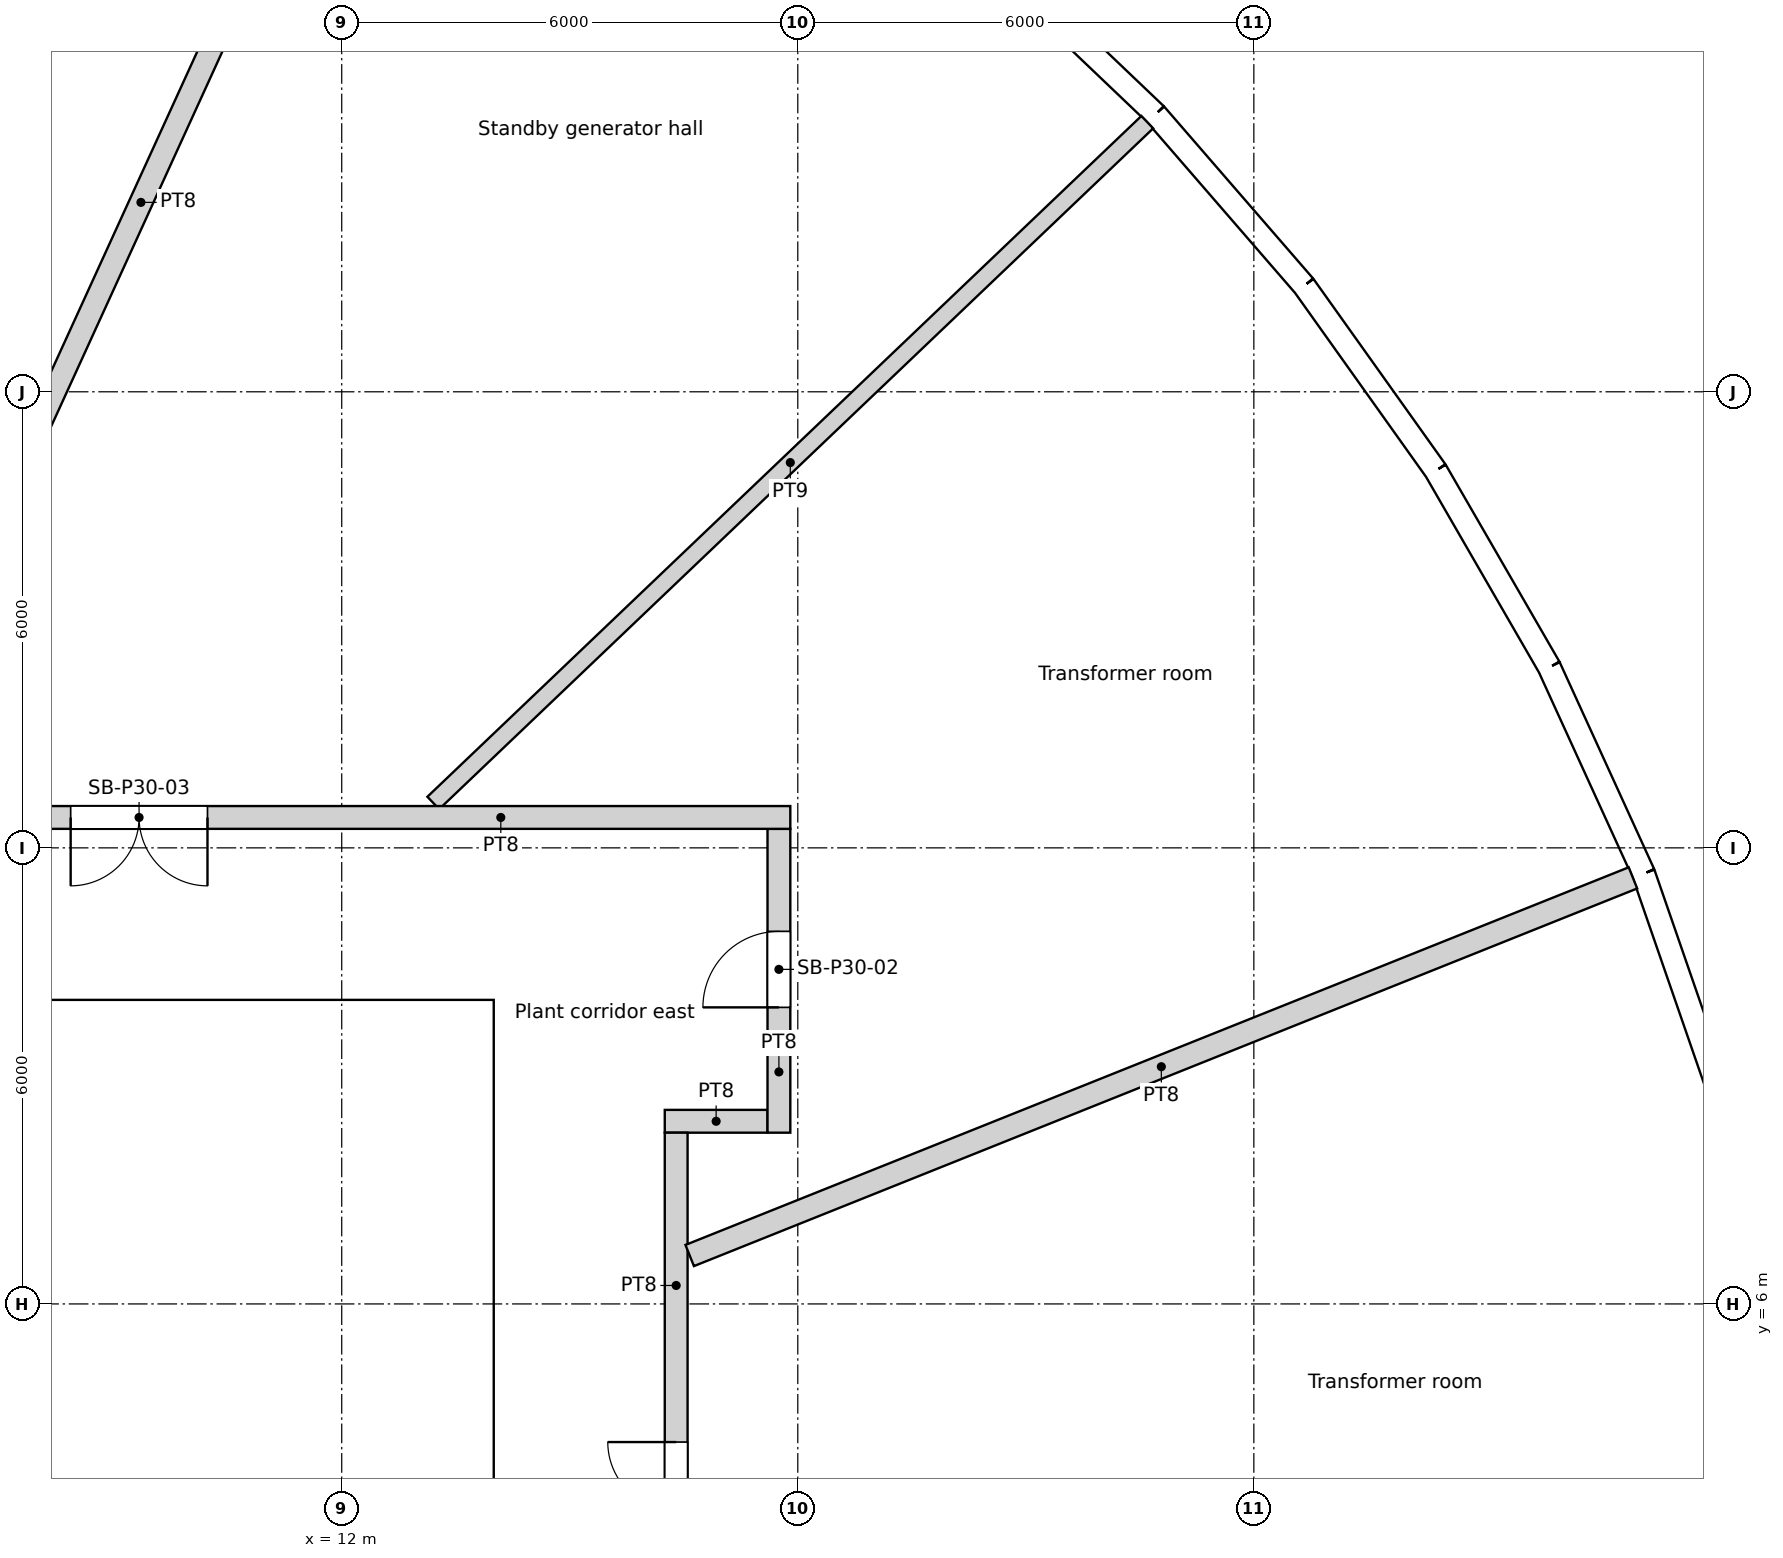
"""IFC4 building model, lengths in metres.
Left out: names, types, materials, properties, quantities, classifications, styles, units other than length and angle.
Written with IfcOpenShell. Run it as: python <this file> out.ifc"""

import sys

from ifc_helpers import new_model, si_unit, direction, frame, frame_2d, origin, origin_2d, place, context, subcontext, project, spatial, rectangle, circle, extrude, element, fill, save


model = new_model("IFC4")
c1 = context("Model", 3, precision=1e-05, world=origin(), true_north=direction((0.0, 1.0)))
c2 = subcontext(c1, "Body", "Model", "MODEL_VIEW")
j1 = project(units=[si_unit("LENGTHUNIT", "METRE"), si_unit("PLANEANGLEUNIT", "RADIAN")], contexts=[c1])
p1 = place(None, origin())
s1 = spatial("IfcSite", under=j1, at=p1, CompositionType="ELEMENT")
p2 = place(p1, origin())
s2 = spatial("IfcBuilding", under=s1, at=p2, CompositionType="ELEMENT")
p3 = place(p2, frame((0.0, 0.0, 120.0)))
s3 = spatial("IfcBuildingStorey", under=s2, at=p3, CompositionType="ELEMENT", Elevation=120.0)
for number, where, z_axis, x_axis in (
    (1, (29.728, 5.729, 0.0), (0.0, 0.0, 1.0), (1.0, 0.0, 0.0)),
    (2, (28.106, 11.252, 0.0), (0.0, 0.0, 1.0), (1.0, 0.0, 0.0)),
    (3, (25.469, 16.368, 0.0), (0.0, 0.0, 1.0), (1.0, 0.0, 0.0)),
    (4, (21.911, 20.892, 0.0), (0.0, 0.0, 1.0), (1.0, 0.0, 0.0)),
):
    element("IfcColumn", number, at=place(p3, frame(where, z_axis=z_axis, x_axis=x_axis)), inside=s3, PredefinedType="COLUMN", context=c2, shape_type="SweptSolid", body=[
        extrude(circle(Radius=0.6, at=origin_2d()), origin(), (0.0, 0.0, 1.0), 6.0),
    ])
for number, where, z_axis, x_axis in (
    (5, (23.886, 5.661, 0.0), (0.0, 0.0, 1.0), (1.0, 0.0, 0.0)),
    (6, (21.937, 11.017, 0.0), (0.0, 0.0, 1.0), (1.0, 0.0, 0.0)),
    (7, (18.805, 15.779, 0.0), (0.0, 0.0, 1.0), (1.0, 0.0, 0.0)),
    (8, (14.659, 19.69, 0.0), (0.0, 0.0, 1.0), (1.0, 0.0, 0.0)),
    (9, (9.723, 22.54, 0.0), (0.0, 0.0, 1.0), (1.0, 0.0, 0.0)),
):
    element("IfcColumn", number, at=place(p3, frame(where, z_axis=z_axis, x_axis=x_axis)), inside=s3, PredefinedType="COLUMN", context=c2, shape_type="SweptSolid", body=[
        extrude(circle(Radius=0.65, at=origin_2d()), origin(), (0.0, 0.0, 1.0), 6.0),
    ])
for number, where, z_axis, x_axis in (
    (10, (17.986, 5.548, 0.0), (0.0, 0.0, 1.0), (1.0, 0.0, 0.0)),
    (11, (15.552, 10.603, 0.0), (0.0, 0.0, 1.0), (1.0, 0.0, 0.0)),
    (12, (11.735, 14.716, 0.0), (0.0, 0.0, 1.0), (1.0, 0.0, 0.0)),
):
    element("IfcColumn", number, at=place(p3, frame(where, z_axis=z_axis, x_axis=x_axis)), inside=s3, PredefinedType="COLUMN", context=c2, shape_type="SweptSolid", body=[
        extrude(circle(Radius=0.7, at=origin_2d()), origin(), (0.0, 0.0, 1.0), 6.0),
    ])
p4 = place(p3, frame((30.104, 8.839, 0.0), z_axis=(0.0, 0.0, 1.0), x_axis=(-0.327074054052, 0.944998710669, 0.0)))
e13 = element("IfcWall", 13, at=p4, inside=s3, PredefinedType="SOLIDWALL", context=c2, shape_type="SweptSolid", body=[
    extrude(rectangle(XDim=2.986, YDim=0.3, at=frame_2d((1.493, 0.0))), origin(), (0.0, 0.0, 1.0), 5.7),
])
p5 = place(p4, frame((1.493, 0.0, 1.8)))
e14 = element("IfcOpeningElement", 14, at=p5, cuts=e13, PredefinedType="OPENING", context=c2, shape_type="SweptSolid", body=[
    extrude(circle(Radius=1.2, at=origin_2d()), frame((0.0, 0.16, 0.0), z_axis=(0.0, -1.0, 0.0), x_axis=(1.0, 0.0, 0.0)), (0.0, 0.0, 1.0), 0.32),
])
p6 = place(p3, frame((29.127, 11.661, 0.0), z_axis=(0.0, 0.0, 1.0), x_axis=(-0.415373250944, 0.909651066289, 0.0)))
e15 = element("IfcWall", 15, at=p6, inside=s3, PredefinedType="SOLIDWALL", context=c2, shape_type="SweptSolid", body=[
    extrude(rectangle(XDim=2.986, YDim=0.3, at=frame_2d((1.493, 0.0))), origin(), (0.0, 0.0, 1.0), 5.7),
])
p7 = place(p6, frame((1.493, 0.0, 1.8)))
e16 = element("IfcOpeningElement", 16, at=p7, cuts=e15, PredefinedType="OPENING", context=c2, shape_type="SweptSolid", body=[
    extrude(circle(Radius=1.2, at=origin_2d()), frame((0.0, 0.16, 0.0), z_axis=(0.0, -1.0, 0.0), x_axis=(1.0, 0.0, 0.0)), (0.0, 0.0, 1.0), 0.32),
])
p8 = place(p3, frame((27.887, 14.377, 0.0), z_axis=(0.0, 0.0, 1.0), x_axis=(-0.500017373705, 0.866015372839, 0.0)))
e17 = element("IfcWall", 17, at=p8, inside=s3, PredefinedType="SOLIDWALL", context=c2, shape_type="SweptSolid", body=[
    extrude(rectangle(XDim=2.986, YDim=0.3, at=frame_2d((1.493, 0.0))), origin(), (0.0, 0.0, 1.0), 5.7),
])
p9 = place(p8, frame((1.493, 0.0, 1.8)))
e18 = element("IfcOpeningElement", 18, at=p9, cuts=e17, PredefinedType="OPENING", context=c2, shape_type="SweptSolid", body=[
    extrude(circle(Radius=1.2, at=origin_2d()), frame((0.0, 0.16, 0.0), z_axis=(0.0, -1.0, 0.0), x_axis=(1.0, 0.0, 0.0)), (0.0, 0.0, 1.0), 0.32),
])
p10 = place(p3, frame((26.394, 16.962, 0.0), z_axis=(0.0, 0.0, 1.0), x_axis=(-0.580100533892, 0.814544885551, 0.0)))
e19 = element("IfcWall", 19, at=p10, inside=s3, PredefinedType="SOLIDWALL", context=c2, shape_type="SweptSolid", body=[
    extrude(rectangle(XDim=2.986, YDim=0.3, at=frame_2d((1.493, 0.0))), origin(), (0.0, 0.0, 1.0), 5.7),
])
p11 = place(p10, frame((1.493, 0.0, 1.8)))
e20 = element("IfcOpeningElement", 20, at=p11, cuts=e19, PredefinedType="OPENING", context=c2, shape_type="SweptSolid", body=[
    extrude(circle(Radius=1.2, at=origin_2d()), frame((0.0, 0.16, 0.0), z_axis=(0.0, -1.0, 0.0), x_axis=(1.0, 0.0, 0.0)), (0.0, 0.0, 1.0), 0.32),
])
p12 = place(p3, frame((24.662, 19.394, 0.0), z_axis=(0.0, 0.0, 1.0), x_axis=(-0.654809121128, 0.755794294029, 0.0)))
e21 = element("IfcWall", 21, at=p12, inside=s3, PredefinedType="SOLIDWALL", context=c2, shape_type="SweptSolid", body=[
    extrude(rectangle(XDim=2.986, YDim=0.3, at=frame_2d((1.493, 0.0))), origin(), (0.0, 0.0, 1.0), 5.7),
])
p13 = place(p12, frame((1.493, 0.0, 1.8)))
e22 = element("IfcOpeningElement", 22, at=p13, cuts=e21, PredefinedType="OPENING", context=c2, shape_type="SweptSolid", body=[
    extrude(circle(Radius=1.2, at=origin_2d()), frame((0.0, 0.16, 0.0), z_axis=(0.0, -1.0, 0.0), x_axis=(1.0, 0.0, 0.0)), (0.0, 0.0, 1.0), 0.32),
])
p14 = place(p3, frame((22.707, 21.651, 0.0), z_axis=(0.0, 0.0, 1.0), x_axis=(-0.723750841228, 0.690061388444, 0.0)))
e23 = element("IfcWall", 23, at=p14, inside=s3, PredefinedType="SOLIDWALL", context=c2, shape_type="SweptSolid", body=[
    extrude(rectangle(XDim=2.986, YDim=0.3, at=frame_2d((1.493, 0.0))), origin(), (0.0, 0.0, 1.0), 5.7),
])
p15 = place(p14, frame((1.493, 0.0, 1.8)))
e24 = element("IfcOpeningElement", 24, at=p15, cuts=e23, PredefinedType="OPENING", context=c2, shape_type="SweptSolid", body=[
    extrude(circle(Radius=1.2, at=origin_2d()), frame((0.0, 0.16, 0.0), z_axis=(0.0, -1.0, 0.0), x_axis=(1.0, 0.0, 0.0)), (0.0, 0.0, 1.0), 0.32),
])
p16 = place(p3, frame((-14.0, 9.4, 0.0), z_axis=(0.0, 0.0, 1.0), x_axis=(1.0, 0.0, 0.0)))
e25 = element("IfcWall", 25, at=p16, inside=s3, PredefinedType="SOLIDWALL", context=c2, shape_type="SweptSolid", body=[
    extrude(rectangle(XDim=28.0, YDim=1.2, at=frame_2d((14.0, 0.0))), origin(), (0.0, 0.0, 1.0), 5.7),
])
p17 = place(p16, frame((9.8, 0.0, 0.0)))
e26 = element("IfcOpeningElement", 26, at=p17, cuts=e25, PredefinedType="OPENING", context=c2, shape_type="SweptSolid", body=[
    extrude(rectangle(XDim=1.8, YDim=2.1, at=frame_2d((0.9, 1.05))), frame((0.0, 0.6, 0.0), z_axis=(0.0, -1.0, 0.0), x_axis=(1.0, 0.0, 0.0)), (0.0, 0.0, 1.0), 1.2),
])
p18 = place(p3, frame((13.4, -8.8, 0.0), z_axis=(0.0, 0.0, 1.0), x_axis=(0.0, 1.0, 0.0)))
e27 = element("IfcWall", 27, at=p18, inside=s3, PredefinedType="SOLIDWALL", context=c2, shape_type="SweptSolid", body=[
    extrude(rectangle(XDim=17.6, YDim=1.2, at=frame_2d((8.8, 0.0))), origin(), (0.0, 0.0, 1.0), 5.7),
])
p19 = place(p18, frame((6.3, 0.0, 0.0)))
e28 = element("IfcOpeningElement", 28, at=p19, cuts=e27, PredefinedType="OPENING", context=c2, shape_type="SweptSolid", body=[
    extrude(rectangle(XDim=1.0, YDim=2.1, at=frame_2d((0.5, 1.05))), frame((0.0, 0.6, 0.0), z_axis=(0.0, -1.0, 0.0), x_axis=(1.0, 0.0, 0.0)), (0.0, 0.0, 1.0), 1.2),
])
p20 = place(p3, frame((9.05, -8.8, 0.0), z_axis=(0.0, 0.0, 1.0), x_axis=(0.0, 1.0, 0.0)))
e29 = element("IfcWall", 29, at=p20, inside=s3, PredefinedType="SOLIDWALL", context=c2, shape_type="SweptSolid", body=[
    extrude(rectangle(XDim=17.6, YDim=0.3, at=frame_2d((8.8, 0.0))), origin(), (0.0, 0.0, 1.0), 5.7),
])
p21 = place(p20, frame((8.8, 0.0, 0.0)))
e30 = element("IfcOpeningElement", 30, at=p21, cuts=e29, PredefinedType="OPENING", context=c2, shape_type="SweptSolid", body=[
    extrude(rectangle(XDim=1.8, YDim=2.1, at=frame_2d((0.9, 1.05))), frame((0.0, 0.15, 0.0), z_axis=(0.0, -1.0, 0.0), x_axis=(1.0, 0.0, 0.0)), (0.0, 0.0, 1.0), 0.3),
])
p22 = place(p3, frame((-8.9, 6.55, 0.0), z_axis=(0.0, 0.0, 1.0), x_axis=(1.0, 0.0, 0.0)))
e31 = element("IfcWall", 31, at=p22, inside=s3, PredefinedType="SOLIDWALL", context=c2, shape_type="SweptSolid", body=[
    extrude(rectangle(XDim=17.8, YDim=0.3, at=frame_2d((8.9, 0.0))), origin(), (0.0, 0.0, 1.0), 5.7),
])
p23 = place(p22, frame((4.75, 0.0, 0.0)))
e32 = element("IfcOpeningElement", 32, at=p23, cuts=e31, PredefinedType="OPENING", context=c2, shape_type="SweptSolid", body=[
    extrude(rectangle(XDim=1.7, YDim=2.1, at=frame_2d((0.85, 1.05))), frame((0.0, 0.15, 0.0), z_axis=(0.0, -1.0, 0.0), x_axis=(1.0, 0.0, 0.0)), (0.0, 0.0, 1.0), 0.3),
])
p24 = place(p3, frame((12.2, 4.7, 0.0), z_axis=(0.0, 0.0, 1.0), x_axis=(0.0, 1.0, 0.0)))
e33 = element("IfcWall", 33, at=p24, inside=s3, PredefinedType="SOLIDWALL", context=c2, shape_type="SweptSolid", body=[
    extrude(rectangle(XDim=4.1, YDim=1.2, at=frame_2d((2.05, 0.0))), origin(), (0.0, 0.0, 1.0), 5.7),
])
p25 = place(p3, frame((9.2, 4.55, 0.0), z_axis=(0.0, 0.0, 1.0), x_axis=(1.0, 0.0, 0.0)))
e34 = element("IfcWall", 34, at=p25, inside=s3, PredefinedType="SOLIDWALL", context=c2, shape_type="SweptSolid", body=[
    extrude(rectangle(XDim=3.6, YDim=0.3, at=frame_2d((1.8, 0.0))), origin(), (0.0, 0.0, 1.0), 5.7),
])
p26 = place(p3, frame((9.2, 8.2, 0.0), z_axis=(0.0, 0.0, 1.0), x_axis=(1.0, 0.0, 0.0)))
e35 = element("IfcWall", 35, at=p26, inside=s3, PredefinedType="SOLIDWALL", context=c2, shape_type="SweptSolid", body=[
    extrude(rectangle(XDim=2.4, YDim=1.2, at=frame_2d((1.2, 0.0))), origin(), (0.0, 0.0, 1.0), 5.7),
])
p27 = place(p3, frame((12.971, 28.403, 0.0), z_axis=(0.0, 0.0, 1.0), x_axis=(-0.415415069181, -0.909631969698, 0.0)))
e36 = element("IfcWall", 36, at=p27, inside=s3, PredefinedType="PARTITIONING", context=c2, shape_type="SweptSolid", body=[
    extrude(rectangle(XDim=17.393, YDim=0.3, at=frame_2d((8.697, 0.0))), origin(), (0.0, 0.0, 1.0), 5.2),
])
p28 = place(p3, frame((16.4, 0.0, 0.0), z_axis=(0.0, 0.0, 1.0), x_axis=(0.0, 1.0, 0.0)))
e37 = element("IfcWall", 37, at=p28, inside=s3, PredefinedType="PARTITIONING", context=c2, shape_type="SweptSolid", body=[
    extrude(rectangle(XDim=8.253, YDim=0.3, at=frame_2d((4.126, 0.0))), origin(), (0.0, 0.0, 1.0), 5.2),
])
p29 = place(p28, frame((2.383, 0.0, 0.0)))
e38 = element("IfcOpeningElement", 38, at=p29, cuts=e37, PredefinedType="OPENING", context=c2, shape_type="SweptSolid", body=[
    extrude(rectangle(XDim=1.8, YDim=2.4, at=frame_2d((0.9, 1.2))), frame((0.0, 0.15, 0.0), z_axis=(0.0, -1.0, 0.0), x_axis=(1.0, 0.0, 0.0)), (0.0, 0.0, 1.0), 0.3),
])
p30 = place(p3, frame((16.25, 8.403, 0.0), z_axis=(0.0, 0.0, 1.0), x_axis=(1.0, 0.0, 0.0)))
e39 = element("IfcWall", 39, at=p30, inside=s3, PredefinedType="PARTITIONING", context=c2, shape_type="SweptSolid", body=[
    extrude(rectangle(XDim=1.352, YDim=0.3, at=frame_2d((0.676, 0.0))), origin(), (0.0, 0.0, 1.0), 5.2),
])
p31 = place(p3, frame((17.752, 8.253, 0.0), z_axis=(0.0, 0.0, 1.0), x_axis=(0.0, 1.0, 0.0)))
e40 = element("IfcWall", 40, at=p31, inside=s3, PredefinedType="PARTITIONING", context=c2, shape_type="SweptSolid", body=[
    extrude(rectangle(XDim=3.997, YDim=0.3, at=frame_2d((1.999, 0.0))), origin(), (0.0, 0.0, 1.0), 5.2),
])
p32 = place(p31, frame((1.649, 0.0, 0.0)))
e41 = element("IfcOpeningElement", 41, at=p32, cuts=e40, PredefinedType="OPENING", context=c2, shape_type="SweptSolid", body=[
    extrude(rectangle(XDim=1.0, YDim=2.1, at=frame_2d((0.5, 1.05))), frame((0.0, 0.15, 0.0), z_axis=(0.0, -1.0, 0.0), x_axis=(1.0, 0.0, 0.0)), (0.0, 0.0, 1.0), 0.3),
])
p33 = place(p3, frame((17.902, 12.4, 0.0), z_axis=(0.0, 0.0, 1.0), x_axis=(-1.0, 0.0, 0.0)))
e42 = element("IfcWall", 42, at=p33, inside=s3, PredefinedType="PARTITIONING", context=c2, shape_type="SweptSolid", body=[
    extrude(rectangle(XDim=17.311, YDim=0.3, at=frame_2d((8.655, 0.0))), origin(), (0.0, 0.0, 1.0), 5.2),
])
p34 = place(p33, frame((7.668, 0.0, 0.0)))
e43 = element("IfcOpeningElement", 43, at=p34, cuts=e42, PredefinedType="OPENING", context=c2, shape_type="SweptSolid", body=[
    extrude(rectangle(XDim=1.8, YDim=2.4, at=frame_2d((0.9, 1.2))), frame((0.0, 0.15, 0.0), z_axis=(0.0, -1.0, 0.0), x_axis=(1.0, 0.0, 0.0)), (0.0, 0.0, 1.0), 0.3),
])
p35 = place(p33, frame((13.875, 0.0, 0.0)))
e44 = element("IfcOpeningElement", 44, at=p35, cuts=e42, PredefinedType="OPENING", context=c2, shape_type="SweptSolid", body=[
    extrude(rectangle(XDim=1.8, YDim=2.4, at=frame_2d((0.9, 1.2))), frame((0.0, 0.15, 0.0), z_axis=(0.0, -1.0, 0.0), x_axis=(1.0, 0.0, 0.0)), (0.0, 0.0, 1.0), 0.3),
])
p36 = place(p3, frame((22.598, 21.547, 0.0), z_axis=(0.0, 0.0, 1.0), x_axis=(-0.723750872009, -0.690061356161, 0.0)))
e45 = element("IfcWall", 45, at=p36, inside=s3, PredefinedType="PARTITIONING", context=c2, shape_type="SweptSolid", body=[
    extrude(rectangle(XDim=12.979, YDim=0.225, at=frame_2d((6.49, 0.0))), origin(), (0.0, 0.0, 1.0), 2.7),
])
p37 = place(p3, frame((28.988, 11.605, 0.0), z_axis=(0.0, 0.0, 1.0), x_axis=(-0.928363284364, -0.37167406722, 0.0)))
e46 = element("IfcWall", 46, at=p37, inside=s3, PredefinedType="PARTITIONING", context=c2, shape_type="SweptSolid", body=[
    extrude(rectangle(XDim=13.367, YDim=0.3, at=frame_2d((6.684, 0.0))), origin(), (0.0, 0.0, 1.0), 5.2),
])
p38 = place(p5, origin())
e47 = element("IfcWindow", 47, at=p38, inside=s3, PartitioningType="SINGLE_PANEL", PredefinedType="WINDOW", context=c2, shape_type="SweptSolid", body=[
    extrude(circle(Radius=1.2, at=origin_2d()), frame((0.0, 0.12, 0.0), z_axis=(0.0, -1.0, 0.0), x_axis=(1.0, 0.0, 0.0)), (0.0, 0.0, 1.0), 0.1),
])
fill(e14, e47)
p39 = place(p7, origin())
e48 = element("IfcWindow", 48, at=p39, inside=s3, PartitioningType="SINGLE_PANEL", PredefinedType="WINDOW", context=c2, shape_type="SweptSolid", body=[
    extrude(circle(Radius=1.2, at=origin_2d()), frame((0.0, 0.12, 0.0), z_axis=(0.0, -1.0, 0.0), x_axis=(1.0, 0.0, 0.0)), (0.0, 0.0, 1.0), 0.1),
])
fill(e16, e48)
p40 = place(p9, origin())
e49 = element("IfcWindow", 49, at=p40, inside=s3, PartitioningType="SINGLE_PANEL", PredefinedType="WINDOW", context=c2, shape_type="SweptSolid", body=[
    extrude(circle(Radius=1.2, at=origin_2d()), frame((0.0, 0.12, 0.0), z_axis=(0.0, -1.0, 0.0), x_axis=(1.0, 0.0, 0.0)), (0.0, 0.0, 1.0), 0.1),
])
fill(e18, e49)
p41 = place(p11, origin())
e50 = element("IfcWindow", 50, at=p41, inside=s3, PartitioningType="SINGLE_PANEL", PredefinedType="WINDOW", context=c2, shape_type="SweptSolid", body=[
    extrude(circle(Radius=1.2, at=origin_2d()), frame((0.0, 0.12, 0.0), z_axis=(0.0, -1.0, 0.0), x_axis=(1.0, 0.0, 0.0)), (0.0, 0.0, 1.0), 0.1),
])
fill(e20, e50)
p42 = place(p13, origin())
e51 = element("IfcWindow", 51, at=p42, inside=s3, PartitioningType="SINGLE_PANEL", PredefinedType="WINDOW", context=c2, shape_type="SweptSolid", body=[
    extrude(circle(Radius=1.2, at=origin_2d()), frame((0.0, 0.12, 0.0), z_axis=(0.0, -1.0, 0.0), x_axis=(1.0, 0.0, 0.0)), (0.0, 0.0, 1.0), 0.1),
])
fill(e22, e51)
p43 = place(p15, origin())
e52 = element("IfcWindow", 52, at=p43, inside=s3, PartitioningType="SINGLE_PANEL", PredefinedType="WINDOW", context=c2, shape_type="SweptSolid", body=[
    extrude(circle(Radius=1.2, at=origin_2d()), frame((0.0, 0.12, 0.0), z_axis=(0.0, -1.0, 0.0), x_axis=(1.0, 0.0, 0.0)), (0.0, 0.0, 1.0), 0.1),
])
fill(e24, e52)
p44 = place(p29, origin())
e53 = element("IfcDoor", 53, at=p44, inside=s3, OperationType="DOUBLE_DOOR_SINGLE_SWING", PredefinedType="DOOR", context=c2, shape_type="SweptSolid", body=[
    extrude(rectangle(XDim=1.8, YDim=2.4, at=frame_2d((0.9, 1.2))), frame((0.0, 0.025, 0.0), z_axis=(0.0, -1.0, 0.0), x_axis=(1.0, 0.0, 0.0)), (0.0, 0.0, 1.0), 0.05),
])
fill(e38, e53)
p45 = place(p32, origin())
e54 = element("IfcDoor", 54, at=p45, inside=s3, OperationType="SINGLE_SWING_LEFT", PredefinedType="DOOR", context=c2, shape_type="SweptSolid", body=[
    extrude(rectangle(XDim=1.0, YDim=2.1, at=frame_2d((0.5, 1.05))), frame((0.0, 0.025, 0.0), z_axis=(0.0, -1.0, 0.0), x_axis=(1.0, 0.0, 0.0)), (0.0, 0.0, 1.0), 0.05),
])
fill(e41, e54)
p46 = place(p34, origin())
e55 = element("IfcDoor", 55, at=p46, inside=s3, OperationType="DOUBLE_DOOR_SINGLE_SWING", PredefinedType="DOOR", context=c2, shape_type="SweptSolid", body=[
    extrude(rectangle(XDim=1.8, YDim=2.4, at=frame_2d((0.9, 1.2))), frame((0.0, 0.025, 0.0), z_axis=(0.0, -1.0, 0.0), x_axis=(1.0, 0.0, 0.0)), (0.0, 0.0, 1.0), 0.05),
])
fill(e43, e55)
save(model, sys.argv[1])
